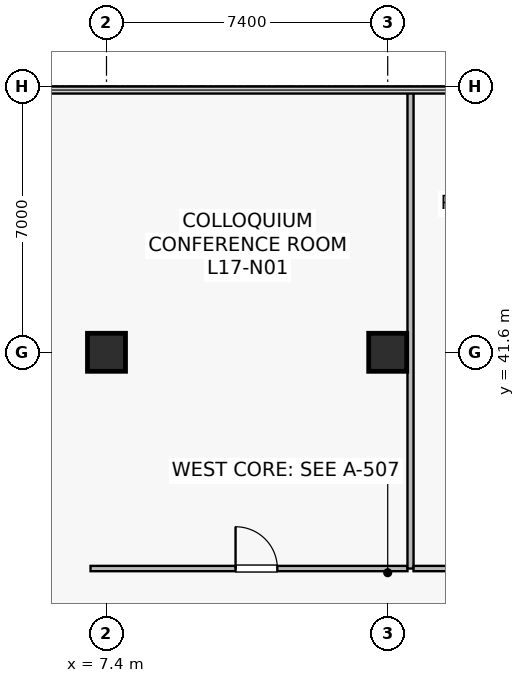
"""IFC4 building model, lengths in metres.
Left out: names, types, materials, properties, quantities, classifications, styles, units other than length and angle.
Written with IfcOpenShell. Run it as: python <this file> out.ifc"""

import sys

from ifc_helpers import new_model, si_unit, direction, frame, frame_2d, origin, origin_2d, place, context, subcontext, project, spatial, rectangle, extrude, source, transform, mapped, element, fill, save


model = new_model("IFC4")
c1 = context("Model", 3, precision=1e-05, world=origin(), true_north=direction((0.0, 1.0)))
c2 = subcontext(c1, "Body", "Model", "MODEL_VIEW")
j1 = project(units=[si_unit("LENGTHUNIT", "METRE"), si_unit("PLANEANGLEUNIT", "RADIAN")], contexts=[c1])
p1 = place(None, origin())
s1 = spatial("IfcSite", under=j1, at=p1, CompositionType="ELEMENT")
p2 = place(p1, origin())
s2 = spatial("IfcBuilding", under=s1, at=p2, CompositionType="ELEMENT")
p3 = place(p2, frame((0.0, 0.0, 70.3)))
s3 = spatial("IfcBuildingStorey", under=s2, at=p3, CompositionType="ELEMENT", Elevation=70.3)
m1 = source(origin(), c2, "Body", "SweptSolid", [
    extrude(rectangle(XDim=1.0, YDim=1.0, at=origin_2d()), origin(), (0.0, 0.0, 1.0), 4.1),
])
for number, where, z_axis, x_axis in (
    (1, (14.8, 41.6, 0.0), (0.0, 0.0, 1.0), (1.0, 0.0, 0.0)),
    (2, (7.4, 41.6, 0.0), (0.0, 0.0, 1.0), (1.0, 0.0, 0.0)),
):
    element("IfcColumn", number, at=place(p3, frame(where, z_axis=z_axis, x_axis=x_axis)), inside=s3, PredefinedType="COLUMN", context=c2, shape_type="MappedRepresentation", body=[
        mapped(m1, transform((0.0, 0.0, 0.0), scale=1.0)),
    ])
p4 = place(p3, frame((6.98, 35.91, 0.0), z_axis=(0.0, 0.0, 1.0), x_axis=(1.0, 0.0, 0.0)))
e3 = element("IfcWall", 3, at=p4, inside=s3, PredefinedType="PARTITIONING", context=c2, shape_type="SweptSolid", body=[
    extrude(rectangle(XDim=8.34, YDim=0.14, at=frame_2d((4.17, 0.0))), origin(), (0.0, 0.0, 1.0), 3.115),
])
p5 = place(p4, frame((3.816, 0.0, 0.0)))
e4 = element("IfcOpeningElement", 4, at=p5, cuts=e3, PredefinedType="OPENING", context=c2, shape_type="SweptSolid", body=[
    extrude(rectangle(XDim=1.1, YDim=2.18, at=frame_2d((0.55, 1.09))), frame((0.0, 0.08, 0.0), z_axis=(0.0, -1.0, 0.0), x_axis=(1.0, 0.0, 0.0)), (0.0, 0.0, 1.0), 0.16),
])
p6 = place(p3, frame((15.4, 35.91, 0.0), z_axis=(0.0, 0.0, 1.0), x_axis=(0.0, 1.0, 0.0)))
e5 = element("IfcWall", 5, at=p6, inside=s3, PredefinedType="PARTITIONING", context=c2, shape_type="SweptSolid", body=[
    extrude(rectangle(XDim=12.58, YDim=0.16, at=frame_2d((6.29, 0.0))), origin(), (0.0, 0.0, 1.0), 3.015),
])
p7 = place(p3, frame((15.48, 35.91, 0.0), z_axis=(0.0, 0.0, 1.0), x_axis=(1.0, 0.0, 0.0)))
e6 = element("IfcWall", 6, at=p7, inside=s3, PredefinedType="PARTITIONING", context=c2, shape_type="SweptSolid", body=[
    extrude(rectangle(XDim=13.24, YDim=0.14, at=frame_2d((6.62, 0.0))), origin(), (0.0, 0.0, 1.0), 3.115),
])
p8 = place(p7, frame((5.04, 0.0, 0.0)))
e7 = element("IfcOpeningElement", 7, at=p8, cuts=e6, PredefinedType="OPENING", context=c2, shape_type="SweptSolid", body=[
    extrude(rectangle(XDim=1.1, YDim=2.18, at=frame_2d((0.55, 1.09))), frame((0.0, 0.08, 0.0), z_axis=(0.0, -1.0, 0.0), x_axis=(1.0, 0.0, 0.0)), (0.0, 0.0, 1.0), 0.16),
])
m2 = source(origin(), c2, "Body", "SweptSolid", [
    extrude(rectangle(XDim=1.1, YDim=2.18, at=frame_2d((0.55, 1.09))), frame((0.0, 0.025, 0.0), z_axis=(0.0, -1.0, 0.0), x_axis=(1.0, 0.0, 0.0)), (0.0, 0.0, 1.0), 0.05),
])
p9 = place(p5, origin())
e8 = element("IfcDoor", 8, at=p9, inside=s3, OperationType="SINGLE_SWING_LEFT", PredefinedType="DOOR", context=c2, shape_type="MappedRepresentation", body=[
    mapped(m2, transform((0.0, 0.0, 0.0), scale=1.0)),
])
fill(e4, e8)
save(model, sys.argv[1])
